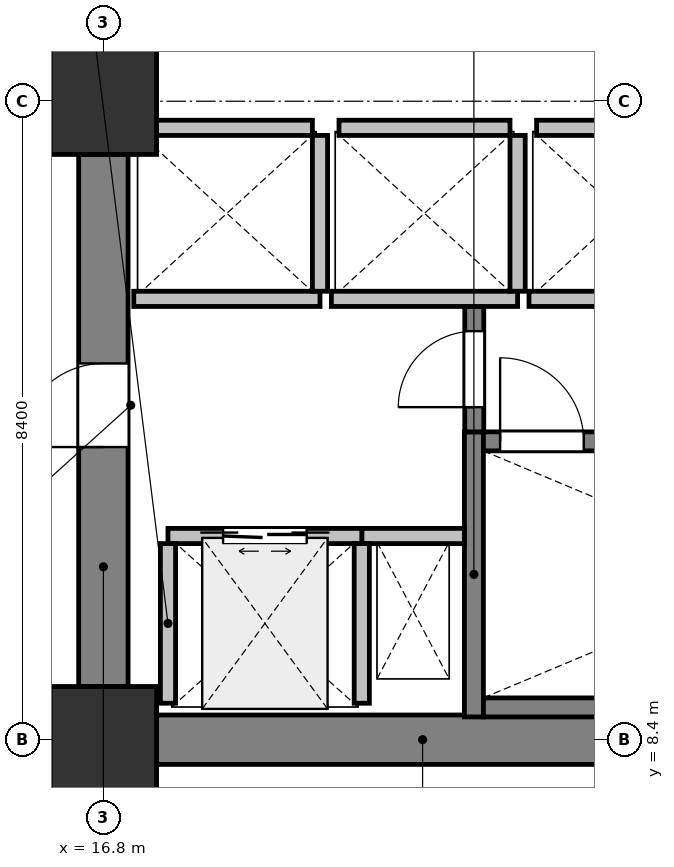
"""IFC4 building model, lengths in metres.
Left out: names, types, materials, properties, quantities, classifications, styles, units other than length and angle.
Written with IfcOpenShell. Run it as: python <this file> out.ifc"""

import sys

from ifc_helpers import new_model, si_unit, direction, frame, frame_2d, origin, origin_2d, place, context, subcontext, project, spatial, rectangle, extrude, element, fill, save


model = new_model("IFC4")
c1 = context("Model", 3, precision=1e-05, world=origin(), true_north=direction((0.0, 1.0)))
c2 = subcontext(c1, "Body", "Model", "MODEL_VIEW")
j1 = project(units=[si_unit("LENGTHUNIT", "METRE"), si_unit("PLANEANGLEUNIT", "RADIAN")], contexts=[c1])
p1 = place(None, origin())
s1 = spatial("IfcSite", under=j1, at=p1, CompositionType="ELEMENT")
p2 = place(p1, origin())
s2 = spatial("IfcBuilding", under=s1, at=p2, CompositionType="ELEMENT")
p3 = place(p2, frame((0.0, 0.0, 79.4)))
s3 = spatial("IfcBuildingStorey", under=s2, at=p3, CompositionType="ELEMENT", Elevation=79.4)
for number, where, z_axis, x_axis in (
    (1, (16.8, 8.4, 0.0), (0.0, 0.0, 1.0), (1.0, 0.0, 0.0)),
    (2, (16.8, 16.8, 0.0), (0.0, 0.0, 1.0), (1.0, 0.0, 0.0)),
):
    element("IfcColumn", number, at=place(p3, frame(where, z_axis=z_axis, x_axis=x_axis)), inside=s3, PredefinedType="COLUMN", context=c2, shape_type="SweptSolid", body=[
        extrude(rectangle(XDim=1.4, YDim=1.4, at=origin_2d()), origin(), (0.0, 0.0, 1.0), 5.0),
    ])
p4 = place(p3, frame((17.5, 8.4, 0.0), z_axis=(0.0, 0.0, 1.0), x_axis=(1.0, 0.0, 0.0)))
e3 = element("IfcWall", 3, at=p4, inside=s3, PredefinedType="SHEAR", context=c2, shape_type="SweptSolid", body=[
    extrude(rectangle(XDim=7.0, YDim=0.65, at=frame_2d((3.5, 0.0))), origin(), (0.0, 0.0, 1.0), 4.725),
])
p5 = place(p3, frame((16.8, 9.1, 0.0), z_axis=(0.0, 0.0, 1.0), x_axis=(0.0, 1.0, 0.0)))
e4 = element("IfcWall", 4, at=p5, inside=s3, PredefinedType="SHEAR", context=c2, shape_type="SweptSolid", body=[
    extrude(rectangle(XDim=7.0, YDim=0.65, at=frame_2d((3.5, 0.0))), origin(), (0.0, 0.0, 1.0), 4.725),
])
p6 = place(p5, frame((3.15, 0.0, 0.0)))
e5 = element("IfcOpeningElement", 5, at=p6, cuts=e4, PredefinedType="OPENING", context=c2, shape_type="SweptSolid", body=[
    extrude(rectangle(XDim=1.1, YDim=2.15, at=frame_2d((0.55, 1.075))), frame((0.0, 0.335, 0.0), z_axis=(0.0, -1.0, 0.0), x_axis=(1.0, 0.0, 0.0)), (0.0, 0.0, 1.0), 0.67),
])
p7 = place(p3, frame((21.675, 8.7, 0.0), z_axis=(0.0, 0.0, 1.0), x_axis=(0.0, 1.0, 0.0)))
e6 = element("IfcWall", 6, at=p7, inside=s3, PredefinedType="SHEAR", context=c2, shape_type="SweptSolid", body=[
    extrude(rectangle(XDim=3.75, YDim=0.25, at=frame_2d((1.875, 0.0))), origin(), (0.0, 0.0, 1.0), 4.725),
])
p8 = place(p3, frame((21.8, 8.825, 0.0), z_axis=(0.0, 0.0, 1.0), x_axis=(1.0, 0.0, 0.0)))
e7 = element("IfcWall", 7, at=p8, inside=s3, PredefinedType="SHEAR", context=c2, shape_type="SweptSolid", body=[
    extrude(rectangle(XDim=7.75, YDim=0.25, at=frame_2d((3.875, 0.0))), origin(), (0.0, 0.0, 1.0), 4.725),
])
p9 = place(p3, frame((21.8, 12.325, 0.0), z_axis=(0.0, 0.0, 1.0), x_axis=(1.0, 0.0, 0.0)))
e8 = element("IfcWall", 8, at=p9, inside=s3, PredefinedType="SHEAR", context=c2, shape_type="SweptSolid", body=[
    extrude(rectangle(XDim=7.75, YDim=0.25, at=frame_2d((3.875, 0.0))), origin(), (0.0, 0.0, 1.0), 4.725),
])
p10 = place(p9, frame((0.22, 0.0, 0.0)))
e9 = element("IfcOpeningElement", 9, at=p10, cuts=e8, PredefinedType="OPENING", context=c2, shape_type="SweptSolid", body=[
    extrude(rectangle(XDim=1.1, YDim=2.15, at=frame_2d((0.55, 1.075))), frame((0.0, 0.135, 0.0), z_axis=(0.0, -1.0, 0.0), x_axis=(1.0, 0.0, 0.0)), (0.0, 0.0, 1.0), 0.27),
])
p11 = place(p3, frame((20.2, 11.08, 0.0), z_axis=(0.0, 0.0, 1.0), x_axis=(1.0, 0.0, 0.0)))
e10 = element("IfcWall", 10, at=p11, inside=s3, PredefinedType="PARTITIONING", context=c2, shape_type="SweptSolid", body=[
    extrude(rectangle(XDim=1.35, YDim=0.2, at=frame_2d((0.675, 0.0))), origin(), (0.0, 0.0, 1.0), 4.725),
])
p12 = place(p3, frame((21.68, 12.45, 0.0), z_axis=(0.0, 0.0, 1.0), x_axis=(0.0, 1.0, 0.0)))
e11 = element("IfcWall", 11, at=p12, inside=s3, PredefinedType="SHEAR", context=c2, shape_type="SweptSolid", body=[
    extrude(rectangle(XDim=1.65, YDim=0.25, at=frame_2d((0.825, 0.0))), origin(), (0.0, 0.0, 1.0), 4.725),
])
p13 = place(p12, frame((0.325, 0.0, 0.0)))
e12 = element("IfcOpeningElement", 12, at=p13, cuts=e11, PredefinedType="OPENING", context=c2, shape_type="SweptSolid", body=[
    extrude(rectangle(XDim=1.0, YDim=2.15, at=frame_2d((0.5, 1.075))), frame((0.0, 0.135, 0.0), z_axis=(0.0, -1.0, 0.0), x_axis=(1.0, 0.0, 0.0)), (0.0, 0.0, 1.0), 0.27),
])
p14 = place(p3, frame((17.65, 11.08, 0.0), z_axis=(0.0, 0.0, 1.0), x_axis=(1.0, 0.0, 0.0)))
e13 = element("IfcWall", 13, at=p14, inside=s3, PredefinedType="PARTITIONING", context=c2, shape_type="SweptSolid", body=[
    extrude(rectangle(XDim=2.55, YDim=0.2, at=frame_2d((1.275, 0.0))), origin(), (0.0, 0.0, 1.0), 4.725),
])
p15 = place(p14, frame((0.725, 0.0, 0.0)))
e14 = element("IfcOpeningElement", 14, at=p15, cuts=e13, PredefinedType="OPENING", context=c2, shape_type="SweptSolid", body=[
    extrude(rectangle(XDim=1.1, YDim=2.2, at=frame_2d((0.55, 1.1))), frame((0.0, 0.11, 0.0), z_axis=(0.0, -1.0, 0.0), x_axis=(1.0, 0.0, 0.0)), (0.0, 0.0, 1.0), 0.22),
])
for number, where, z_axis, x_axis in (
    (15, (20.2, 8.88, 0.0), (0.0, 0.0, 1.0), (0.0, 1.0, 0.0)),
    (16, (17.65, 8.88, 0.0), (0.0, 0.0, 1.0), (0.0, 1.0, 0.0)),
):
    element("IfcWall", number, at=place(p3, frame(where, z_axis=z_axis, x_axis=x_axis)), inside=s3, PredefinedType="PARTITIONING", context=c2, shape_type="SweptSolid", body=[
        extrude(rectangle(XDim=2.1, YDim=0.2, at=frame_2d((1.05, 0.0))), origin(), (0.0, 0.0, 1.0), 4.725),
    ])
p16 = place(p3, frame((17.2, 14.2, 0.0), z_axis=(0.0, 0.0, 1.0), x_axis=(1.0, 0.0, 0.0)))
e17 = element("IfcWall", 17, at=p16, inside=s3, PredefinedType="PARTITIONING", context=c2, shape_type="SweptSolid", body=[
    extrude(rectangle(XDim=2.45, YDim=0.2, at=frame_2d((1.225, 0.0))), origin(), (0.0, 0.0, 1.0), 4.725),
])
p17 = place(p3, frame((19.65, 14.3, 0.0), z_axis=(0.0, 0.0, 1.0), x_axis=(0.0, 1.0, 0.0)))
e18 = element("IfcWall", 18, at=p17, inside=s3, PredefinedType="PARTITIONING", context=c2, shape_type="SweptSolid", body=[
    extrude(rectangle(XDim=2.05, YDim=0.2, at=frame_2d((1.025, 0.0))), origin(), (0.0, 0.0, 1.0), 4.725),
])
p18 = place(p3, frame((17.3, 16.45, 0.0), z_axis=(0.0, 0.0, 1.0), x_axis=(1.0, 0.0, 0.0)))
e19 = element("IfcWall", 19, at=p18, inside=s3, PredefinedType="PARTITIONING", context=c2, shape_type="SweptSolid", body=[
    extrude(rectangle(XDim=2.25, YDim=0.2, at=frame_2d((1.125, 0.0))), origin(), (0.0, 0.0, 1.0), 4.725),
])
p19 = place(p3, frame((19.8, 14.2, 0.0), z_axis=(0.0, 0.0, 1.0), x_axis=(1.0, 0.0, 0.0)))
e20 = element("IfcWall", 20, at=p19, inside=s3, PredefinedType="PARTITIONING", context=c2, shape_type="SweptSolid", body=[
    extrude(rectangle(XDim=2.45, YDim=0.2, at=frame_2d((1.225, 0.0))), origin(), (0.0, 0.0, 1.0), 4.725),
])
p20 = place(p3, frame((22.25, 14.3, 0.0), z_axis=(0.0, 0.0, 1.0), x_axis=(0.0, 1.0, 0.0)))
e21 = element("IfcWall", 21, at=p20, inside=s3, PredefinedType="PARTITIONING", context=c2, shape_type="SweptSolid", body=[
    extrude(rectangle(XDim=2.05, YDim=0.2, at=frame_2d((1.025, 0.0))), origin(), (0.0, 0.0, 1.0), 4.725),
])
p21 = place(p3, frame((19.9, 16.45, 0.0), z_axis=(0.0, 0.0, 1.0), x_axis=(1.0, 0.0, 0.0)))
e22 = element("IfcWall", 22, at=p21, inside=s3, PredefinedType="PARTITIONING", context=c2, shape_type="SweptSolid", body=[
    extrude(rectangle(XDim=2.25, YDim=0.2, at=frame_2d((1.125, 0.0))), origin(), (0.0, 0.0, 1.0), 4.725),
])
p22 = place(p3, frame((22.4, 14.2, 0.0), z_axis=(0.0, 0.0, 1.0), x_axis=(1.0, 0.0, 0.0)))
e23 = element("IfcWall", 23, at=p22, inside=s3, PredefinedType="PARTITIONING", context=c2, shape_type="SweptSolid", body=[
    extrude(rectangle(XDim=2.45, YDim=0.2, at=frame_2d((1.225, 0.0))), origin(), (0.0, 0.0, 1.0), 4.725),
])
p23 = place(p3, frame((22.5, 16.45, 0.0), z_axis=(0.0, 0.0, 1.0), x_axis=(1.0, 0.0, 0.0)))
e24 = element("IfcWall", 24, at=p23, inside=s3, PredefinedType="PARTITIONING", context=c2, shape_type="SweptSolid", body=[
    extrude(rectangle(XDim=2.25, YDim=0.2, at=frame_2d((1.125, 0.0))), origin(), (0.0, 0.0, 1.0), 4.725),
])
p24 = place(p6, origin())
e25 = element("IfcDoor", 25, at=p24, inside=s3, OperationType="SINGLE_SWING_LEFT", PredefinedType="DOOR", context=c2, shape_type="SweptSolid", body=[
    extrude(rectangle(XDim=1.1, YDim=2.15, at=frame_2d((0.55, 1.075))), frame((0.0, 0.025, 0.0), z_axis=(0.0, -1.0, 0.0), x_axis=(1.0, 0.0, 0.0)), (0.0, 0.0, 1.0), 0.05),
])
fill(e5, e25)
p25 = place(p10, origin())
e26 = element("IfcDoor", 26, at=p25, inside=s3, OperationType="SINGLE_SWING_LEFT", PredefinedType="DOOR", context=c2, shape_type="SweptSolid", body=[
    extrude(rectangle(XDim=1.1, YDim=2.15, at=frame_2d((0.55, 1.075))), frame((0.0, 0.025, 0.0), z_axis=(0.0, -1.0, 0.0), x_axis=(1.0, 0.0, 0.0)), (0.0, 0.0, 1.0), 0.05),
])
fill(e9, e26)
p26 = place(p13, origin())
e27 = element("IfcDoor", 27, at=p26, inside=s3, OperationType="SINGLE_SWING_LEFT", PredefinedType="DOOR", context=c2, shape_type="SweptSolid", body=[
    extrude(rectangle(XDim=1.0, YDim=2.15, at=frame_2d((0.5, 1.075))), frame((0.0, 0.025, 0.0), z_axis=(0.0, -1.0, 0.0), x_axis=(1.0, 0.0, 0.0)), (0.0, 0.0, 1.0), 0.05),
])
fill(e12, e27)
p27 = place(p15, origin())
e28 = element("IfcDoor", 28, at=p27, inside=s3, OperationType="DOUBLE_DOOR_SLIDING", PredefinedType="DOOR", context=c2, shape_type="SweptSolid", body=[
    extrude(rectangle(XDim=1.1, YDim=2.2, at=frame_2d((0.55, 1.1))), frame((0.0, 0.025, 0.0), z_axis=(0.0, -1.0, 0.0), x_axis=(1.0, 0.0, 0.0)), (0.0, 0.0, 1.0), 0.05),
])
fill(e14, e28)
save(model, sys.argv[1])
